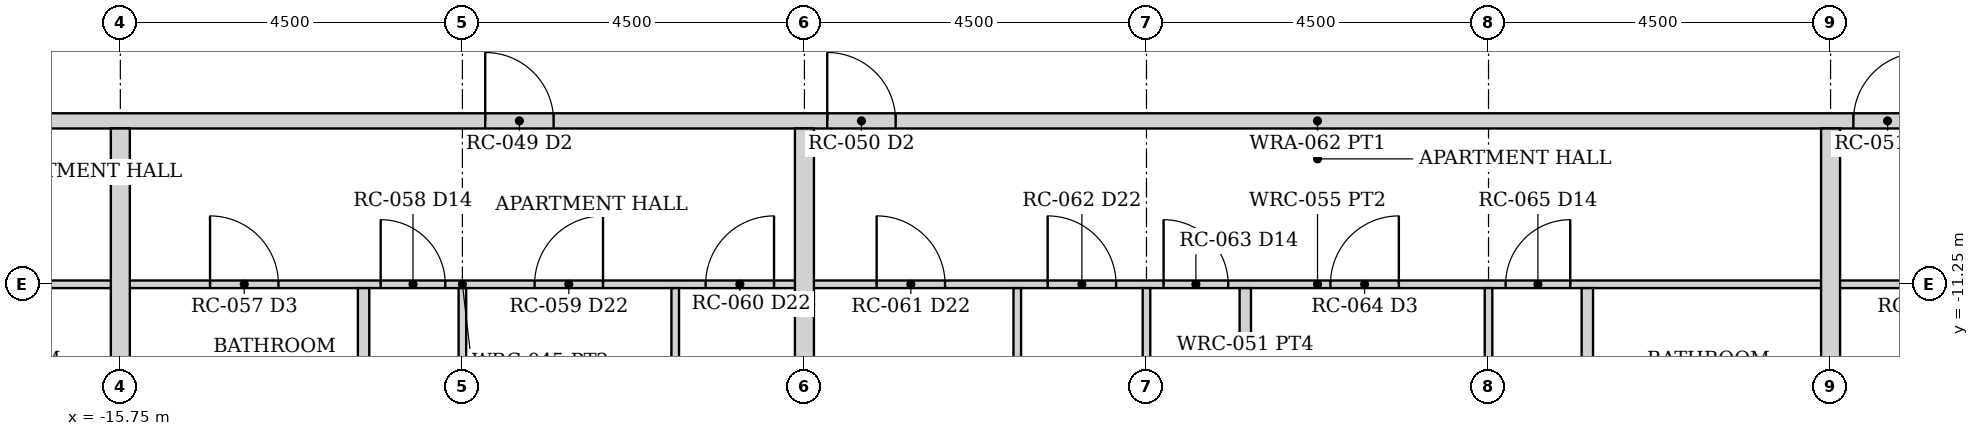
"""IFC4 building model, lengths in metres.
Left out: names, types, materials, properties, quantities, classifications, styles, units other than length and angle.
Written with IfcOpenShell. Run it as: python <this file> out.ifc"""

import sys

from ifc_helpers import new_model, si_unit, direction, frame, frame_2d, origin, place, context, subcontext, project, spatial, rectangle, extrude, element, fill, save


model = new_model("IFC4")
c1 = context("Model", 3, precision=1e-05, world=origin(), true_north=direction((0.0, 1.0)))
c2 = subcontext(c1, "Body", "Model", "MODEL_VIEW")
j1 = project(units=[si_unit("LENGTHUNIT", "METRE"), si_unit("PLANEANGLEUNIT", "RADIAN")], contexts=[c1])
p1 = place(None, origin())
s1 = spatial("IfcSite", under=j1, at=p1, CompositionType="ELEMENT")
p2 = place(p1, origin())
s2 = spatial("IfcBuilding", under=s1, at=p2, CompositionType="ELEMENT")
p3 = place(p2, frame((0.0, 0.0, 47.5)))
s3 = spatial("IfcBuildingStorey", under=s2, at=p3, CompositionType="ELEMENT", Elevation=47.5)
p4 = place(p3, frame((-24.55, -9.1, 0.0), z_axis=(0.0, 0.0, 1.0), x_axis=(1.0, 0.0, 0.0)))
e1 = element("IfcWall", 1, at=p4, inside=s3, PredefinedType="PARTITIONING", context=c2, shape_type="SweptSolid", body=[
    extrude(rectangle(XDim=49.1, YDim=0.2, at=frame_2d((24.55, 0.0))), origin(), (0.0, 0.0, 1.0), 2.373),
])
p5 = place(p4, frame((5.1, 0.0, 0.0)))
e2 = element("IfcOpeningElement", 2, at=p5, cuts=e1, PredefinedType="OPENING", context=c2, shape_type="SweptSolid", body=[
    extrude(rectangle(XDim=0.9, YDim=2.1, at=frame_2d((0.45, 1.05))), frame((0.0, 0.11, 0.0), z_axis=(0.0, -1.0, 0.0), x_axis=(1.0, 0.0, 0.0)), (0.0, 0.0, 1.0), 0.22),
])
p6 = place(p4, frame((13.6, 0.0, 0.0)))
e3 = element("IfcOpeningElement", 3, at=p6, cuts=e1, PredefinedType="OPENING", context=c2, shape_type="SweptSolid", body=[
    extrude(rectangle(XDim=0.9, YDim=2.1, at=frame_2d((0.45, 1.05))), frame((0.0, 0.11, 0.0), z_axis=(0.0, -1.0, 0.0), x_axis=(1.0, 0.0, 0.0)), (0.0, 0.0, 1.0), 0.22),
])
p7 = place(p4, frame((18.1, 0.0, 0.0)))
e4 = element("IfcOpeningElement", 4, at=p7, cuts=e1, PredefinedType="OPENING", context=c2, shape_type="SweptSolid", body=[
    extrude(rectangle(XDim=0.9, YDim=2.1, at=frame_2d((0.45, 1.05))), frame((0.0, 0.11, 0.0), z_axis=(0.0, -1.0, 0.0), x_axis=(1.0, 0.0, 0.0)), (0.0, 0.0, 1.0), 0.22),
])
p8 = place(p4, frame((31.6, 0.0, 0.0)))
e5 = element("IfcOpeningElement", 5, at=p8, cuts=e1, PredefinedType="OPENING", context=c2, shape_type="SweptSolid", body=[
    extrude(rectangle(XDim=0.9, YDim=2.1, at=frame_2d((0.45, 1.05))), frame((0.0, 0.11, 0.0), z_axis=(0.0, -1.0, 0.0), x_axis=(1.0, 0.0, 0.0)), (0.0, 0.0, 1.0), 0.22),
])
p9 = place(p4, frame((43.1, 0.0, 0.0)))
e6 = element("IfcOpeningElement", 6, at=p9, cuts=e1, PredefinedType="OPENING", context=c2, shape_type="SweptSolid", body=[
    extrude(rectangle(XDim=0.9, YDim=2.1, at=frame_2d((0.45, 1.05))), frame((0.0, 0.11, 0.0), z_axis=(0.0, -1.0, 0.0), x_axis=(1.0, 0.0, 0.0)), (0.0, 0.0, 1.0), 0.22),
])
p10 = place(p3, frame((-24.35, -11.25, 0.0), z_axis=(0.0, 0.0, 1.0), x_axis=(1.0, 0.0, 0.0)))
e7 = element("IfcWall", 7, at=p10, inside=s3, PredefinedType="PARTITIONING", context=c2, shape_type="SweptSolid", body=[
    extrude(rectangle(XDim=8.5, YDim=0.1, at=frame_2d((4.25, 0.0))), origin(), (0.0, 0.0, 1.0), 2.373),
])
p11 = place(p10, frame((2.375, 0.0, 0.0)))
e8 = element("IfcOpeningElement", 8, at=p11, cuts=e7, PredefinedType="OPENING", context=c2, shape_type="SweptSolid", body=[
    extrude(rectangle(XDim=0.9, YDim=2.1, at=frame_2d((0.45, 1.05))), frame((0.0, 0.06, 0.0), z_axis=(0.0, -1.0, 0.0), x_axis=(1.0, 0.0, 0.0)), (0.0, 0.0, 1.0), 0.12),
])
p12 = place(p10, frame((0.35, 0.0, 0.0)))
e9 = element("IfcOpeningElement", 9, at=p12, cuts=e7, PredefinedType="OPENING", context=c2, shape_type="SweptSolid", body=[
    extrude(rectangle(XDim=0.9, YDim=2.1, at=frame_2d((0.45, 1.05))), frame((0.0, 0.06, 0.0), z_axis=(0.0, -1.0, 0.0), x_axis=(1.0, 0.0, 0.0)), (0.0, 0.0, 1.0), 0.12),
])
p13 = place(p10, frame((4.325, 0.0, 0.0)))
e10 = element("IfcOpeningElement", 10, at=p13, cuts=e7, PredefinedType="OPENING", context=c2, shape_type="SweptSolid", body=[
    extrude(rectangle(XDim=0.85, YDim=2.1, at=frame_2d((0.425, 1.05))), frame((0.0, 0.06, 0.0), z_axis=(0.0, -1.0, 0.0), x_axis=(1.0, 0.0, 0.0)), (0.0, 0.0, 1.0), 0.12),
])
p14 = place(p10, frame((6.52, 0.0, 0.0)))
e11 = element("IfcOpeningElement", 11, at=p14, cuts=e7, PredefinedType="OPENING", context=c2, shape_type="SweptSolid", body=[
    extrude(rectangle(XDim=0.9, YDim=2.1, at=frame_2d((0.45, 1.05))), frame((0.0, 0.06, 0.0), z_axis=(0.0, -1.0, 0.0), x_axis=(1.0, 0.0, 0.0)), (0.0, 0.0, 1.0), 0.12),
])
p15 = place(p3, frame((-15.65, -11.25, 0.0), z_axis=(0.0, 0.0, 1.0), x_axis=(1.0, 0.0, 0.0)))
e12 = element("IfcWall", 12, at=p15, inside=s3, PredefinedType="PARTITIONING", context=c2, shape_type="SweptSolid", body=[
    extrude(rectangle(XDim=8.8, YDim=0.1, at=frame_2d((4.4, 0.0))), origin(), (0.0, 0.0, 1.0), 2.373),
])
p16 = place(p15, frame((5.35, 0.0, 0.0)))
e13 = element("IfcOpeningElement", 13, at=p16, cuts=e12, PredefinedType="OPENING", context=c2, shape_type="SweptSolid", body=[
    extrude(rectangle(XDim=0.9, YDim=2.1, at=frame_2d((0.45, 1.05))), frame((0.0, 0.06, 0.0), z_axis=(0.0, -1.0, 0.0), x_axis=(1.0, 0.0, 0.0)), (0.0, 0.0, 1.0), 0.12),
])
p17 = place(p15, frame((7.6, 0.0, 0.0)))
e14 = element("IfcOpeningElement", 14, at=p17, cuts=e12, PredefinedType="OPENING", context=c2, shape_type="SweptSolid", body=[
    extrude(rectangle(XDim=0.9, YDim=2.1, at=frame_2d((0.45, 1.05))), frame((0.0, 0.06, 0.0), z_axis=(0.0, -1.0, 0.0), x_axis=(1.0, 0.0, 0.0)), (0.0, 0.0, 1.0), 0.12),
])
p18 = place(p15, frame((3.325, 0.0, 0.0)))
e15 = element("IfcOpeningElement", 15, at=p18, cuts=e12, PredefinedType="OPENING", context=c2, shape_type="SweptSolid", body=[
    extrude(rectangle(XDim=0.85, YDim=2.1, at=frame_2d((0.425, 1.05))), frame((0.0, 0.06, 0.0), z_axis=(0.0, -1.0, 0.0), x_axis=(1.0, 0.0, 0.0)), (0.0, 0.0, 1.0), 0.12),
])
p19 = place(p15, frame((1.08, 0.0, 0.0)))
e16 = element("IfcOpeningElement", 16, at=p19, cuts=e12, PredefinedType="OPENING", context=c2, shape_type="SweptSolid", body=[
    extrude(rectangle(XDim=0.9, YDim=2.1, at=frame_2d((0.45, 1.05))), frame((0.0, 0.06, 0.0), z_axis=(0.0, -1.0, 0.0), x_axis=(1.0, 0.0, 0.0)), (0.0, 0.0, 1.0), 0.12),
])
p20 = place(p3, frame((-8.45, -15.35, 0.0), z_axis=(0.0, 0.0, 1.0), x_axis=(0.0, 1.0, 0.0)))
e17 = element("IfcWall", 17, at=p20, inside=s3, PredefinedType="PARTITIONING", context=c2, shape_type="SweptSolid", body=[
    extrude(rectangle(XDim=4.05, YDim=0.1, at=frame_2d((2.025, 0.0))), origin(), (0.0, 0.0, 1.0), 2.373),
])
p21 = place(p3, frame((-11.25, -24.35, 0.0), z_axis=(0.0, 0.0, 1.0), x_axis=(0.0, 1.0, 0.0)))
e18 = element("IfcWall", 18, at=p21, inside=s3, PredefinedType="PARTITIONING", context=c2, shape_type="SweptSolid", body=[
    extrude(rectangle(XDim=13.05, YDim=0.1, at=frame_2d((6.525, 0.0))), origin(), (0.0, 0.0, 1.0), 2.373),
])
p22 = place(p3, frame((-12.55, -14.4, 0.0), z_axis=(0.0, 0.0, 1.0), x_axis=(0.0, 1.0, 0.0)))
e19 = element("IfcWall", 19, at=p22, inside=s3, PredefinedType="PARTITIONING", context=c2, shape_type="SweptSolid", body=[
    extrude(rectangle(XDim=3.1, YDim=0.15, at=frame_2d((1.55, 0.0))), origin(), (0.0, 0.0, 1.0), 2.373),
])
p23 = place(p22, frame((1.15, 0.0, 0.0)))
e20 = element("IfcOpeningElement", 20, at=p23, cuts=e19, PredefinedType="OPENING", context=c2, shape_type="SweptSolid", body=[
    extrude(rectangle(XDim=0.9, YDim=2.1, at=frame_2d((0.45, 1.05))), frame((0.0, 0.085, 0.0), z_axis=(0.0, -1.0, 0.0), x_axis=(1.0, 0.0, 0.0)), (0.0, 0.0, 1.0), 0.17),
])
p24 = place(p3, frame((-6.65, -11.25, 0.0), z_axis=(0.0, 0.0, 1.0), x_axis=(1.0, 0.0, 0.0)))
e21 = element("IfcWall", 21, at=p24, inside=s3, PredefinedType="PARTITIONING", context=c2, shape_type="SweptSolid", body=[
    extrude(rectangle(XDim=13.3, YDim=0.1, at=frame_2d((6.65, 0.0))), origin(), (0.0, 0.0, 1.0), 2.373),
])
p25 = place(p24, frame((0.85, 0.0, 0.0)))
e22 = element("IfcOpeningElement", 22, at=p25, cuts=e21, PredefinedType="OPENING", context=c2, shape_type="SweptSolid", body=[
    extrude(rectangle(XDim=0.9, YDim=2.1, at=frame_2d((0.45, 1.05))), frame((0.0, 0.06, 0.0), z_axis=(0.0, -1.0, 0.0), x_axis=(1.0, 0.0, 0.0)), (0.0, 0.0, 1.0), 0.12),
])
p26 = place(p24, frame((3.1, 0.0, 0.0)))
e23 = element("IfcOpeningElement", 23, at=p26, cuts=e21, PredefinedType="OPENING", context=c2, shape_type="SweptSolid", body=[
    extrude(rectangle(XDim=0.9, YDim=2.1, at=frame_2d((0.45, 1.05))), frame((0.0, 0.06, 0.0), z_axis=(0.0, -1.0, 0.0), x_axis=(1.0, 0.0, 0.0)), (0.0, 0.0, 1.0), 0.12),
])
p27 = place(p24, frame((4.625, 0.0, 0.0)))
e24 = element("IfcOpeningElement", 24, at=p27, cuts=e21, PredefinedType="OPENING", context=c2, shape_type="SweptSolid", body=[
    extrude(rectangle(XDim=0.85, YDim=2.1, at=frame_2d((0.425, 1.05))), frame((0.0, 0.06, 0.0), z_axis=(0.0, -1.0, 0.0), x_axis=(1.0, 0.0, 0.0)), (0.0, 0.0, 1.0), 0.12),
])
p28 = place(p24, frame((6.82, 0.0, 0.0)))
e25 = element("IfcOpeningElement", 25, at=p28, cuts=e21, PredefinedType="OPENING", context=c2, shape_type="SweptSolid", body=[
    extrude(rectangle(XDim=0.9, YDim=2.1, at=frame_2d((0.45, 1.05))), frame((0.0, 0.06, 0.0), z_axis=(0.0, -1.0, 0.0), x_axis=(1.0, 0.0, 0.0)), (0.0, 0.0, 1.0), 0.12),
])
p29 = place(p24, frame((9.125, 0.0, 0.0)))
e26 = element("IfcOpeningElement", 26, at=p29, cuts=e21, PredefinedType="OPENING", context=c2, shape_type="SweptSolid", body=[
    extrude(rectangle(XDim=0.85, YDim=2.1, at=frame_2d((0.425, 1.05))), frame((0.0, 0.06, 0.0), z_axis=(0.0, -1.0, 0.0), x_axis=(1.0, 0.0, 0.0)), (0.0, 0.0, 1.0), 0.12),
])
p30 = place(p3, frame((-3.95, -15.35, 0.0), z_axis=(0.0, 0.0, 1.0), x_axis=(0.0, 1.0, 0.0)))
e27 = element("IfcWall", 27, at=p30, inside=s3, PredefinedType="PARTITIONING", context=c2, shape_type="SweptSolid", body=[
    extrude(rectangle(XDim=4.05, YDim=0.1, at=frame_2d((2.025, 0.0))), origin(), (0.0, 0.0, 1.0), 2.373),
])
p31 = place(p3, frame((-2.25, -24.35, 0.0), z_axis=(0.0, 0.0, 1.0), x_axis=(0.0, 1.0, 0.0)))
e28 = element("IfcWall", 28, at=p31, inside=s3, PredefinedType="PARTITIONING", context=c2, shape_type="SweptSolid", body=[
    extrude(rectangle(XDim=13.05, YDim=0.1, at=frame_2d((6.525, 0.0))), origin(), (0.0, 0.0, 1.0), 2.373),
])
p32 = place(p3, frame((-0.95, -14.4, 0.0), z_axis=(0.0, 0.0, 1.0), x_axis=(0.0, 1.0, 0.0)))
e29 = element("IfcWall", 29, at=p32, inside=s3, PredefinedType="PARTITIONING", context=c2, shape_type="SweptSolid", body=[
    extrude(rectangle(XDim=3.1, YDim=0.15, at=frame_2d((1.55, 0.0))), origin(), (0.0, 0.0, 1.0), 2.373),
])
p33 = place(p32, frame((1.15, 0.0, 0.0)))
e30 = element("IfcOpeningElement", 30, at=p33, cuts=e29, PredefinedType="OPENING", context=c2, shape_type="SweptSolid", body=[
    extrude(rectangle(XDim=0.9, YDim=2.1, at=frame_2d((0.45, 1.05))), frame((0.0, 0.085, 0.0), z_axis=(0.0, -1.0, 0.0), x_axis=(1.0, 0.0, 0.0)), (0.0, 0.0, 1.0), 0.17),
])
p34 = place(p3, frame((2.25, -24.35, 0.0), z_axis=(0.0, 0.0, 1.0), x_axis=(0.0, 1.0, 0.0)))
e31 = element("IfcWall", 31, at=p34, inside=s3, PredefinedType="PARTITIONING", context=c2, shape_type="SweptSolid", body=[
    extrude(rectangle(XDim=13.05, YDim=0.1, at=frame_2d((6.525, 0.0))), origin(), (0.0, 0.0, 1.0), 2.373),
])
p35 = place(p3, frame((3.55, -14.4, 0.0), z_axis=(0.0, 0.0, 1.0), x_axis=(0.0, 1.0, 0.0)))
e32 = element("IfcWall", 32, at=p35, inside=s3, PredefinedType="PARTITIONING", context=c2, shape_type="SweptSolid", body=[
    extrude(rectangle(XDim=3.1, YDim=0.15, at=frame_2d((1.55, 0.0))), origin(), (0.0, 0.0, 1.0), 2.373),
])
p36 = place(p35, frame((1.15, 0.0, 0.0)))
e33 = element("IfcOpeningElement", 33, at=p36, cuts=e32, PredefinedType="OPENING", context=c2, shape_type="SweptSolid", body=[
    extrude(rectangle(XDim=0.9, YDim=2.1, at=frame_2d((0.45, 1.05))), frame((0.0, 0.085, 0.0), z_axis=(0.0, -1.0, 0.0), x_axis=(1.0, 0.0, 0.0)), (0.0, 0.0, 1.0), 0.17),
])
p37 = place(p3, frame((6.85, -11.25, 0.0), z_axis=(0.0, 0.0, 1.0), x_axis=(1.0, 0.0, 0.0)))
e34 = element("IfcWall", 34, at=p37, inside=s3, PredefinedType="PARTITIONING", context=c2, shape_type="SweptSolid", body=[
    extrude(rectangle(XDim=8.8, YDim=0.1, at=frame_2d((4.4, 0.0))), origin(), (0.0, 0.0, 1.0), 2.373),
])
p38 = place(p37, frame((0.85, 0.0, 0.0)))
e35 = element("IfcOpeningElement", 35, at=p38, cuts=e34, PredefinedType="OPENING", context=c2, shape_type="SweptSolid", body=[
    extrude(rectangle(XDim=0.9, YDim=2.1, at=frame_2d((0.45, 1.05))), frame((0.0, 0.06, 0.0), z_axis=(0.0, -1.0, 0.0), x_axis=(1.0, 0.0, 0.0)), (0.0, 0.0, 1.0), 0.12),
])
p39 = place(p37, frame((3.1, 0.0, 0.0)))
e36 = element("IfcOpeningElement", 36, at=p39, cuts=e34, PredefinedType="OPENING", context=c2, shape_type="SweptSolid", body=[
    extrude(rectangle(XDim=0.9, YDim=2.1, at=frame_2d((0.45, 1.05))), frame((0.0, 0.06, 0.0), z_axis=(0.0, -1.0, 0.0), x_axis=(1.0, 0.0, 0.0)), (0.0, 0.0, 1.0), 0.12),
])
p40 = place(p37, frame((4.625, 0.0, 0.0)))
e37 = element("IfcOpeningElement", 37, at=p40, cuts=e34, PredefinedType="OPENING", context=c2, shape_type="SweptSolid", body=[
    extrude(rectangle(XDim=0.85, YDim=2.1, at=frame_2d((0.425, 1.05))), frame((0.0, 0.06, 0.0), z_axis=(0.0, -1.0, 0.0), x_axis=(1.0, 0.0, 0.0)), (0.0, 0.0, 1.0), 0.12),
])
p41 = place(p37, frame((6.82, 0.0, 0.0)))
e38 = element("IfcOpeningElement", 38, at=p41, cuts=e34, PredefinedType="OPENING", context=c2, shape_type="SweptSolid", body=[
    extrude(rectangle(XDim=0.9, YDim=2.1, at=frame_2d((0.45, 1.05))), frame((0.0, 0.06, 0.0), z_axis=(0.0, -1.0, 0.0), x_axis=(1.0, 0.0, 0.0)), (0.0, 0.0, 1.0), 0.12),
])
for number, where, z_axis, x_axis in (
    (39, (-15.75, -24.35, 0.0), (0.0, 0.0, 1.0), (0.0, 1.0, 0.0)),
    (40, (-6.75, -24.35, 0.0), (0.0, 0.0, 1.0), (0.0, 1.0, 0.0)),
    (41, (6.75, -24.35, 0.0), (0.0, 0.0, 1.0), (0.0, 1.0, 0.0)),
):
    element("IfcWall", number, at=place(p3, frame(where, z_axis=z_axis, x_axis=x_axis)), inside=s3, PredefinedType="PARTITIONING", context=c2, shape_type="SweptSolid", body=[
        extrude(rectangle(XDim=15.15, YDim=0.25, at=frame_2d((7.575, 0.0))), origin(), (0.0, 0.0, 1.0), 2.373),
    ])
p42 = place(p6, origin())
e42 = element("IfcDoor", 42, at=p42, inside=s3, OperationType="SINGLE_SWING_LEFT", PredefinedType="DOOR", context=c2, shape_type="SweptSolid", body=[
    extrude(rectangle(XDim=0.9, YDim=2.1, at=frame_2d((0.45, 1.05))), frame((0.0, 0.025, 0.0), z_axis=(0.0, -1.0, 0.0), x_axis=(1.0, 0.0, 0.0)), (0.0, 0.0, 1.0), 0.05),
])
fill(e3, e42)
p43 = place(p16, origin())
e43 = element("IfcDoor", 43, at=p43, inside=s3, OperationType="SINGLE_SWING_RIGHT", PredefinedType="DOOR", context=c2, shape_type="SweptSolid", body=[
    extrude(rectangle(XDim=0.9, YDim=2.1, at=frame_2d((0.45, 1.05))), frame((0.0, 0.025, 0.0), z_axis=(0.0, -1.0, 0.0), x_axis=(1.0, 0.0, 0.0)), (0.0, 0.0, 1.0), 0.05),
])
fill(e13, e43)
p44 = place(p17, origin())
e44 = element("IfcDoor", 44, at=p44, inside=s3, OperationType="SINGLE_SWING_RIGHT", PredefinedType="DOOR", context=c2, shape_type="SweptSolid", body=[
    extrude(rectangle(XDim=0.9, YDim=2.1, at=frame_2d((0.45, 1.05))), frame((0.0, 0.025, 0.0), z_axis=(0.0, -1.0, 0.0), x_axis=(1.0, 0.0, 0.0)), (0.0, 0.0, 1.0), 0.05),
])
fill(e14, e44)
p45 = place(p18, origin())
e45 = element("IfcDoor", 45, at=p45, inside=s3, OperationType="SINGLE_SWING_LEFT", PredefinedType="DOOR", context=c2, shape_type="SweptSolid", body=[
    extrude(rectangle(XDim=0.85, YDim=2.1, at=frame_2d((0.425, 1.05))), frame((0.0, 0.025, 0.0), z_axis=(0.0, -1.0, 0.0), x_axis=(1.0, 0.0, 0.0)), (0.0, 0.0, 1.0), 0.05),
])
fill(e15, e45)
p46 = place(p19, origin())
e46 = element("IfcDoor", 46, at=p46, inside=s3, OperationType="SINGLE_SWING_LEFT", PredefinedType="DOOR", context=c2, shape_type="SweptSolid", body=[
    extrude(rectangle(XDim=0.9, YDim=2.1, at=frame_2d((0.45, 1.05))), frame((0.0, 0.025, 0.0), z_axis=(0.0, -1.0, 0.0), x_axis=(1.0, 0.0, 0.0)), (0.0, 0.0, 1.0), 0.05),
])
fill(e16, e46)
p47 = place(p7, origin())
e47 = element("IfcDoor", 47, at=p47, inside=s3, OperationType="SINGLE_SWING_LEFT", PredefinedType="DOOR", context=c2, shape_type="SweptSolid", body=[
    extrude(rectangle(XDim=0.9, YDim=2.1, at=frame_2d((0.45, 1.05))), frame((0.0, 0.025, 0.0), z_axis=(0.0, -1.0, 0.0), x_axis=(1.0, 0.0, 0.0)), (0.0, 0.0, 1.0), 0.05),
])
fill(e4, e47)
p48 = place(p25, origin())
e48 = element("IfcDoor", 48, at=p48, inside=s3, OperationType="SINGLE_SWING_LEFT", PredefinedType="DOOR", context=c2, shape_type="SweptSolid", body=[
    extrude(rectangle(XDim=0.9, YDim=2.1, at=frame_2d((0.45, 1.05))), frame((0.0, 0.025, 0.0), z_axis=(0.0, -1.0, 0.0), x_axis=(1.0, 0.0, 0.0)), (0.0, 0.0, 1.0), 0.05),
])
fill(e22, e48)
p49 = place(p26, origin())
e49 = element("IfcDoor", 49, at=p49, inside=s3, OperationType="SINGLE_SWING_LEFT", PredefinedType="DOOR", context=c2, shape_type="SweptSolid", body=[
    extrude(rectangle(XDim=0.9, YDim=2.1, at=frame_2d((0.45, 1.05))), frame((0.0, 0.025, 0.0), z_axis=(0.0, -1.0, 0.0), x_axis=(1.0, 0.0, 0.0)), (0.0, 0.0, 1.0), 0.05),
])
fill(e23, e49)
p50 = place(p27, origin())
e50 = element("IfcDoor", 50, at=p50, inside=s3, OperationType="SINGLE_SWING_LEFT", PredefinedType="DOOR", context=c2, shape_type="SweptSolid", body=[
    extrude(rectangle(XDim=0.85, YDim=2.1, at=frame_2d((0.425, 1.05))), frame((0.0, 0.025, 0.0), z_axis=(0.0, -1.0, 0.0), x_axis=(1.0, 0.0, 0.0)), (0.0, 0.0, 1.0), 0.05),
])
fill(e24, e50)
p51 = place(p28, origin())
e51 = element("IfcDoor", 51, at=p51, inside=s3, OperationType="SINGLE_SWING_RIGHT", PredefinedType="DOOR", context=c2, shape_type="SweptSolid", body=[
    extrude(rectangle(XDim=0.9, YDim=2.1, at=frame_2d((0.45, 1.05))), frame((0.0, 0.025, 0.0), z_axis=(0.0, -1.0, 0.0), x_axis=(1.0, 0.0, 0.0)), (0.0, 0.0, 1.0), 0.05),
])
fill(e25, e51)
p52 = place(p29, origin())
e52 = element("IfcDoor", 52, at=p52, inside=s3, OperationType="SINGLE_SWING_RIGHT", PredefinedType="DOOR", context=c2, shape_type="SweptSolid", body=[
    extrude(rectangle(XDim=0.85, YDim=2.1, at=frame_2d((0.425, 1.05))), frame((0.0, 0.025, 0.0), z_axis=(0.0, -1.0, 0.0), x_axis=(1.0, 0.0, 0.0)), (0.0, 0.0, 1.0), 0.05),
])
fill(e26, e52)
p53 = place(p8, origin())
e53 = element("IfcDoor", 53, at=p53, inside=s3, OperationType="SINGLE_SWING_RIGHT", PredefinedType="DOOR", context=c2, shape_type="SweptSolid", body=[
    extrude(rectangle(XDim=0.9, YDim=2.1, at=frame_2d((0.45, 1.05))), frame((0.0, 0.025, 0.0), z_axis=(0.0, -1.0, 0.0), x_axis=(1.0, 0.0, 0.0)), (0.0, 0.0, 1.0), 0.05),
])
fill(e5, e53)
save(model, sys.argv[1])
